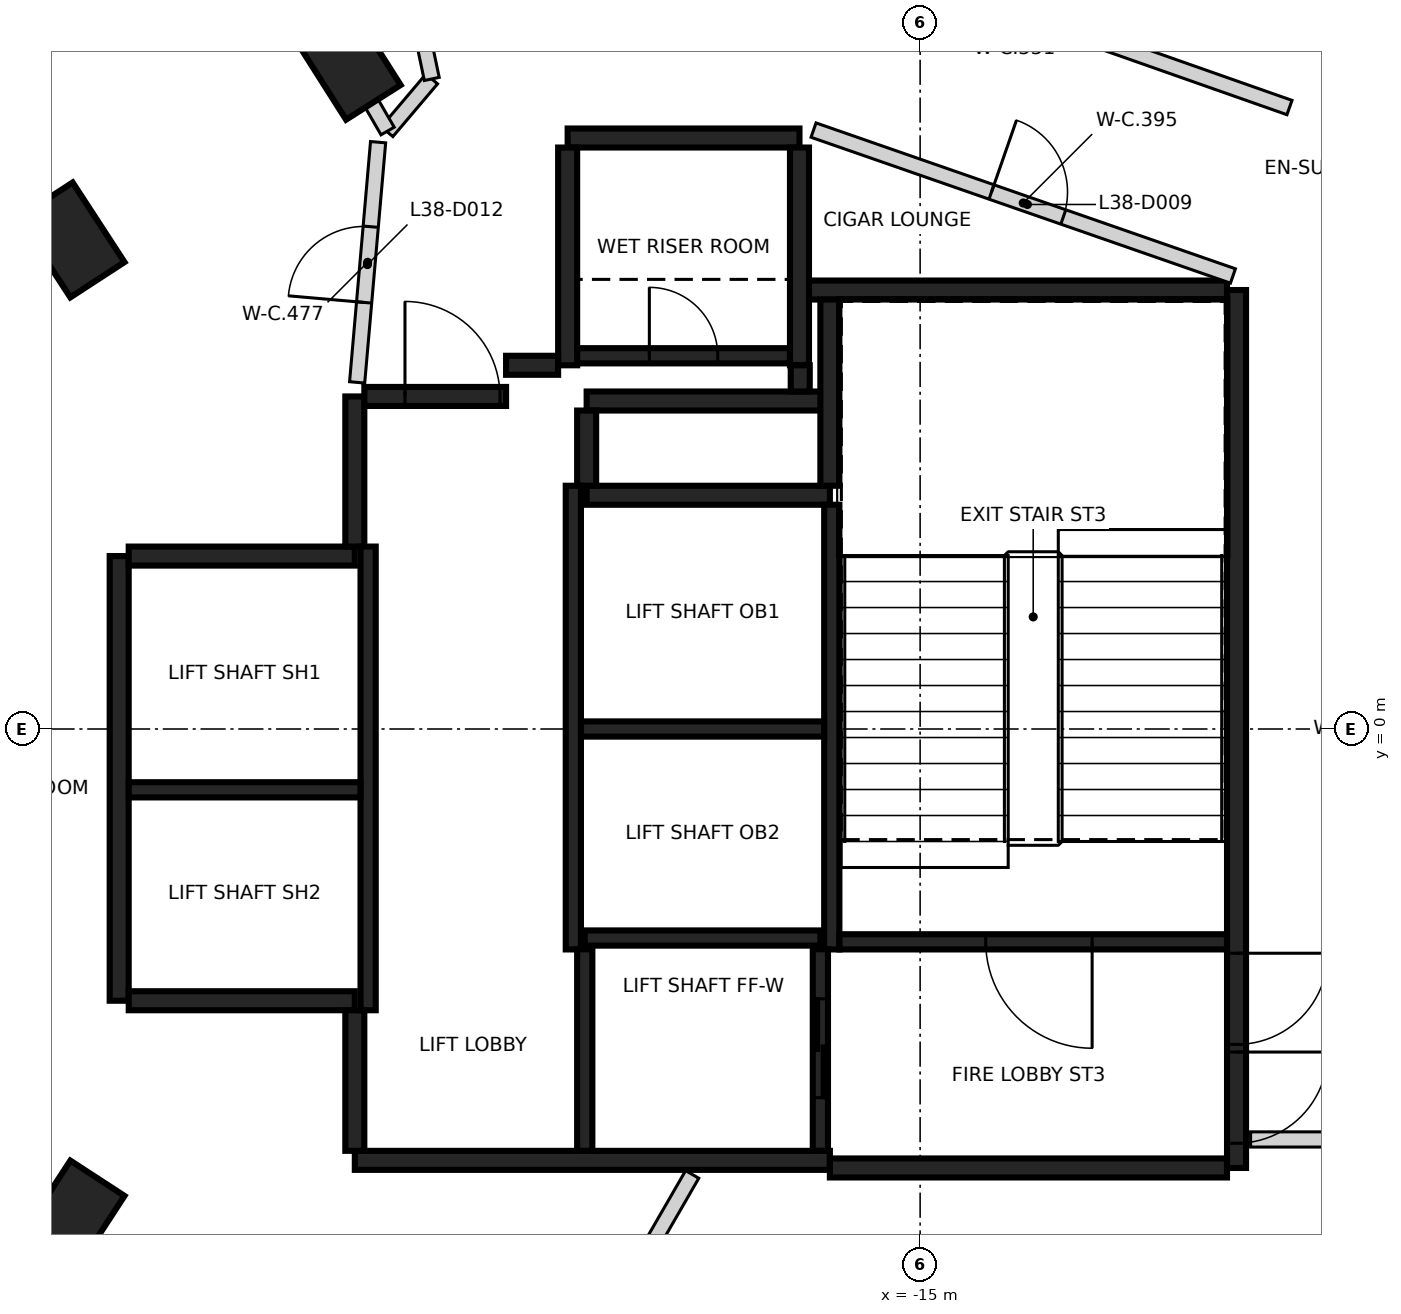
"""IFC4 building model, lengths in metres.
Left out: names, types, materials, properties, quantities, classifications, styles, units other than length and angle.
Written with IfcOpenShell. Run it as: python <this file> out.ifc"""

import sys

from ifc_helpers import new_model, si_unit, direction, frame, frame_2d, origin, origin_2d, place, context, subcontext, project, spatial, rectangle, extrude, element, fill, save


model = new_model("IFC4")
c1 = context("Model", 3, precision=1e-05, world=origin(), true_north=direction((0.0, 1.0)))
c2 = subcontext(c1, "Body", "Model", "MODEL_VIEW")
j1 = project(units=[si_unit("LENGTHUNIT", "METRE"), si_unit("PLANEANGLEUNIT", "RADIAN")], contexts=[c1])
p1 = place(None, origin())
s1 = spatial("IfcSite", under=j1, at=p1, CompositionType="ELEMENT")
p2 = place(p1, origin())
s2 = spatial("IfcBuilding", under=s1, at=p2, CompositionType="ELEMENT")
p3 = place(p2, frame((0.0, 0.0, 154.0)))
s3 = spatial("IfcBuildingStorey", under=s2, at=p3, CompositionType="ELEMENT", Elevation=154.0)
for number, where, z_axis, x_axis in (
    (1, (-22.529, 8.772, -0.4), (0.0, 0.0, 1.0), (-0.536, 0.844, 0.0)),
    (2, (-26.165, 6.434, -0.4), (0.0, 0.0, 1.0), (-0.546, 0.838, 0.0)),
    (3, (-26.165, -6.434, -0.4), (0.0, 0.0, 1.0), (0.546, 0.838, 0.0)),
):
    element("IfcColumn", number, at=place(p3, frame(where, z_axis=z_axis, x_axis=x_axis)), inside=s3, PredefinedType="COLUMN", context=c2, shape_type="SweptSolid", body=[
        extrude(rectangle(XDim=1.25, YDim=0.85, at=origin_2d()), origin(), (0.0, 0.0, 1.0), 3.6),
    ])
p4 = place(p3, frame((-10.837, 5.775, 0.0), z_axis=(0.0, 0.0, 1.0), x_axis=(0.0, -1.0, 0.0)))
e4 = element("IfcWall", 4, at=p4, inside=s3, PredefinedType="SHEAR", context=c2, shape_type="SweptSolid", body=[
    extrude(rectangle(XDim=11.55, YDim=0.25, at=frame_2d((5.775, 0.0))), origin(), (0.0, 0.0, 1.0), 3.2),
])
p5 = place(p4, frame((10.025, 0.0, 0.0)))
e5 = element("IfcOpeningElement", 5, at=p5, cuts=e4, PredefinedType="OPENING", context=c2, shape_type="SweptSolid", body=[
    extrude(rectangle(XDim=1.2, YDim=2.1, at=frame_2d((0.6, 1.05))), frame((0.0, 0.135, 0.0), z_axis=(0.0, -1.0, 0.0), x_axis=(1.0, 0.0, 0.0)), (0.0, 0.0, 1.0), 0.27),
])
p6 = place(p4, frame((8.725, 0.0, 0.0)))
e6 = element("IfcOpeningElement", 6, at=p6, cuts=e4, PredefinedType="OPENING", context=c2, shape_type="SweptSolid", body=[
    extrude(rectangle(XDim=1.2, YDim=2.1, at=frame_2d((0.6, 1.05))), frame((0.0, 0.135, 0.0), z_axis=(0.0, -1.0, 0.0), x_axis=(1.0, 0.0, 0.0)), (0.0, 0.0, 1.0), 0.27),
])
p7 = place(p3, frame((-16.187, -5.675, 0.0), z_axis=(0.0, 0.0, 1.0), x_axis=(-1.0, 0.0, 0.0)))
e7 = element("IfcWall", 7, at=p7, inside=s3, PredefinedType="SHEAR", context=c2, shape_type="SweptSolid", body=[
    extrude(rectangle(XDim=6.25, YDim=0.25, at=frame_2d((3.125, 0.0))), origin(), (0.0, 0.0, 1.0), 3.2),
])
p8 = place(p3, frame((-25.537, -3.575, 0.0), z_axis=(0.0, 0.0, 1.0), x_axis=(0.0, 1.0, 0.0)))
e8 = element("IfcWall", 8, at=p8, inside=s3, PredefinedType="SHEAR", context=c2, shape_type="SweptSolid", body=[
    extrude(rectangle(XDim=5.85, YDim=0.25, at=frame_2d((2.925, 0.0))), origin(), (0.0, 0.0, 1.0), 3.2),
])
p9 = place(p3, frame((-10.963, -5.775, 0.0), z_axis=(0.0, 0.0, 1.0), x_axis=(-1.0, 0.0, 0.0)))
e9 = element("IfcWall", 9, at=p9, inside=s3, PredefinedType="SHEAR", context=c2, shape_type="SweptSolid", body=[
    extrude(rectangle(XDim=5.225, YDim=0.25, at=frame_2d((2.612, 0.0))), origin(), (0.0, 0.0, 1.0), 3.2),
])
p10 = place(p3, frame((-16.472, 5.775, 0.0), z_axis=(0.0, 0.0, 1.0), x_axis=(1.0, 0.0, 0.0)))
e10 = element("IfcWall", 10, at=p10, inside=s3, PredefinedType="SHEAR", context=c2, shape_type="SweptSolid", body=[
    extrude(rectangle(XDim=5.51, YDim=0.25, at=frame_2d((2.755, 0.0))), origin(), (0.0, 0.0, 1.0), 3.2),
])
p11 = place(p3, frame((-19.387, 3.075, 0.0), z_axis=(0.0, 0.0, 1.0), x_axis=(1.0, 0.0, 0.0)))
e11 = element("IfcWall", 11, at=p11, inside=s3, PredefinedType="SHEAR", context=c2, shape_type="SweptSolid", body=[
    extrude(rectangle(XDim=3.2, YDim=0.25, at=frame_2d((1.6, 0.0))), origin(), (0.0, 0.0, 1.0), 3.2),
])
for number, where, z_axis, x_axis in (
    (12, (-22.437, -3.575, 0.0), (0.0, 0.0, 1.0), (-1.0, 0.0, 0.0)),
    (13, (-25.412, 2.275, 0.0), (0.0, 0.0, 1.0), (1.0, 0.0, 0.0)),
):
    element("IfcWall", number, at=place(p3, frame(where, z_axis=z_axis, x_axis=x_axis)), inside=s3, PredefinedType="SHEAR", context=c2, shape_type="SweptSolid", body=[
        extrude(rectangle(XDim=2.975, YDim=0.25, at=frame_2d((1.487, 0.0))), origin(), (0.0, 0.0, 1.0), 3.2),
    ])
p12 = place(p3, frame((-19.637, 7.775, 0.0), z_axis=(0.0, 0.0, 1.0), x_axis=(1.0, 0.0, 0.0)))
e14 = element("IfcWall", 14, at=p12, inside=s3, PredefinedType="SHEAR", context=c2, shape_type="SweptSolid", body=[
    extrude(rectangle(XDim=3.05, YDim=0.25, at=frame_2d((1.525, 0.0))), origin(), (0.0, 0.0, 1.0), 3.2),
])
for number, where, z_axis, x_axis in (
    (15, (-16.587, 7.65, 0.0), (0.0, 0.0, 1.0), (0.0, -1.0, 0.0)),
    (16, (-19.637, 4.785, 0.0), (0.0, 0.0, 1.0), (0.0, 1.0, 0.0)),
):
    element("IfcWall", number, at=place(p3, frame(where, z_axis=z_axis, x_axis=x_axis)), inside=s3, PredefinedType="SHEAR", context=c2, shape_type="SweptSolid", body=[
        extrude(rectangle(XDim=2.865, YDim=0.25, at=frame_2d((1.432, 0.0))), origin(), (0.0, 0.0, 1.0), 3.2),
    ])
p13 = place(p3, frame((-16.302, 4.315, 0.0), z_axis=(0.0, 0.0, 1.0), x_axis=(-1.0, 0.0, 0.0)))
e17 = element("IfcWall", 17, at=p13, inside=s3, PredefinedType="SHEAR", context=c2, shape_type="SweptSolid", body=[
    extrude(rectangle(XDim=3.085, YDim=0.25, at=frame_2d((1.542, 0.0))), origin(), (0.0, 0.0, 1.0), 3.2),
])
p14 = place(p3, frame((-16.187, 3.2, 0.0), z_axis=(0.0, 0.0, 1.0), x_axis=(0.0, 1.0, 0.0)))
e18 = element("IfcWall", 18, at=p14, inside=s3, PredefinedType="SHEAR", context=c2, shape_type="SweptSolid", body=[
    extrude(rectangle(XDim=2.449, YDim=0.25, at=frame_2d((1.225, 0.0))), origin(), (0.0, 0.0, 1.0), 3.2),
])
p15 = place(p3, frame((-22.437, 2.4, 0.0), z_axis=(0.0, 0.0, 1.0), x_axis=(0.0, 1.0, 0.0)))
e19 = element("IfcWall", 19, at=p15, inside=s3, PredefinedType="SHEAR", context=c2, shape_type="SweptSolid", body=[
    extrude(rectangle(XDim=1.975, YDim=0.25, at=frame_2d((0.987, 0.0))), origin(), (0.0, 0.0, 1.0), 3.2),
])
p16 = place(p3, frame((-22.437, -5.55, 0.0), z_axis=(0.0, 0.0, 1.0), x_axis=(0.0, 1.0, 0.0)))
e20 = element("IfcWall", 20, at=p16, inside=s3, PredefinedType="SHEAR", context=c2, shape_type="SweptSolid", body=[
    extrude(rectangle(XDim=1.849, YDim=0.25, at=frame_2d((0.925, 0.0))), origin(), (0.0, 0.0, 1.0), 3.2),
])
p17 = place(p3, frame((-22.312, 4.375, 0.0), z_axis=(0.0, 0.0, 1.0), x_axis=(1.0, 0.0, 0.0)))
e21 = element("IfcWall", 21, at=p17, inside=s3, PredefinedType="SHEAR", context=c2, shape_type="SweptSolid", body=[
    extrude(rectangle(XDim=1.865, YDim=0.25, at=frame_2d((0.932, 0.0))), origin(), (0.0, 0.0, 1.0), 3.2),
])
p18 = place(p17, frame((0.535, 0.0, 0.0)))
e22 = element("IfcOpeningElement", 22, at=p18, cuts=e21, PredefinedType="OPENING", context=c2, shape_type="SweptSolid", body=[
    extrude(rectangle(XDim=1.25, YDim=2.1, at=frame_2d((0.625, 1.05))), frame((0.0, 0.135, 0.0), z_axis=(0.0, -1.0, 0.0), x_axis=(1.0, 0.0, 0.0)), (0.0, 0.0, 1.0), 0.27),
])
p19 = place(p3, frame((-19.387, 4.19, 0.0), z_axis=(0.0, 0.0, 1.0), x_axis=(0.0, -1.0, 0.0)))
e23 = element("IfcWall", 23, at=p19, inside=s3, PredefinedType="SHEAR", context=c2, shape_type="SweptSolid", body=[
    extrude(rectangle(XDim=0.989, YDim=0.25, at=frame_2d((0.495, 0.0))), origin(), (0.0, 0.0, 1.0), 3.2),
])
p20 = place(p3, frame((-20.447, 4.785, 0.0), z_axis=(0.0, 0.0, 1.0), x_axis=(1.0, 0.0, 0.0)))
e24 = element("IfcWall", 24, at=p20, inside=s3, PredefinedType="SHEAR", context=c2, shape_type="SweptSolid", body=[
    extrude(rectangle(XDim=0.685, YDim=0.25, at=frame_2d((0.342, 0.0))), origin(), (0.0, 0.0, 1.0), 3.2),
])
p21 = place(p3, frame((-16.577, 4.785, 0.0), z_axis=(0.0, 0.0, 1.0), x_axis=(0.0, -1.0, 0.0)))
e25 = element("IfcWall", 25, at=p21, inside=s3, PredefinedType="SHEAR", context=c2, shape_type="SweptSolid", body=[
    extrude(rectangle(XDim=0.344, YDim=0.25, at=frame_2d((0.172, 0.0))), origin(), (0.0, 0.0, 1.0), 3.2),
])
p22 = place(p3, frame((-16.162, 2.951, 0.0), z_axis=(0.0, 0.0, 1.0), x_axis=(0.0, -1.0, 0.0)))
e26 = element("IfcWall", 26, at=p22, inside=s3, PredefinedType="SHEAR", context=c2, shape_type="SweptSolid", body=[
    extrude(rectangle(XDim=5.851, YDim=0.2, at=frame_2d((2.925, 0.0))), origin(), (0.0, 0.0, 1.0), 3.2),
])
for number, where, z_axis, x_axis in (
    (27, (-19.562, -2.9, 0.0), (0.0, 0.0, 1.0), (0.0, 1.0, 0.0)),
    (28, (-22.262, 2.4, 0.0), (0.0, 0.0, 1.0), (0.0, -1.0, 0.0)),
):
    element("IfcWall", number, at=place(p3, frame(where, z_axis=z_axis, x_axis=x_axis)), inside=s3, PredefinedType="SHEAR", context=c2, shape_type="SweptSolid", body=[
        extrude(rectangle(XDim=6.1, YDim=0.2, at=frame_2d((3.05, 0.0))), origin(), (0.0, 0.0, 1.0), 3.2),
    ])
p23 = place(p3, frame((-10.963, -2.8, 0.0), z_axis=(0.0, 0.0, 1.0), x_axis=(-1.0, 0.0, 0.0)))
e29 = element("IfcWall", 29, at=p23, inside=s3, PredefinedType="SHEAR", context=c2, shape_type="SweptSolid", body=[
    extrude(rectangle(XDim=5.098, YDim=0.2, at=frame_2d((2.549, 0.0))), origin(), (0.0, 0.0, 1.0), 3.2),
])
p24 = place(p23, frame((1.774, 0.0, 0.0)))
e30 = element("IfcOpeningElement", 30, at=p24, cuts=e29, PredefinedType="OPENING", context=c2, shape_type="SweptSolid", body=[
    extrude(rectangle(XDim=1.4, YDim=2.1, at=frame_2d((0.7, 1.05))), frame((0.0, 0.11, 0.0), z_axis=(0.0, -1.0, 0.0), x_axis=(1.0, 0.0, 0.0)), (0.0, 0.0, 1.0), 0.22),
])
p25 = place(p3, frame((-16.263, 0.0, 0.0), z_axis=(0.0, 0.0, 1.0), x_axis=(-1.0, 0.0, 0.0)))
e31 = element("IfcWall", 31, at=p25, inside=s3, PredefinedType="SHEAR", context=c2, shape_type="SweptSolid", body=[
    extrude(rectangle(XDim=3.198, YDim=0.2, at=frame_2d((1.599, 0.0))), origin(), (0.0, 0.0, 1.0), 3.2),
])
p26 = place(p3, frame((-22.363, -0.8, 0.0), z_axis=(0.0, 0.0, 1.0), x_axis=(-1.0, 0.0, 0.0)))
e32 = element("IfcWall", 32, at=p26, inside=s3, PredefinedType="SHEAR", context=c2, shape_type="SweptSolid", body=[
    extrude(rectangle(XDim=3.048, YDim=0.2, at=frame_2d((1.524, 0.0))), origin(), (0.0, 0.0, 1.0), 3.2),
])
p27 = place(p3, frame((-19.511, 4.91, 0.0), z_axis=(0.0, 0.0, 1.0), x_axis=(1.0, 0.0, 0.0)))
e33 = element("IfcWall", 33, at=p27, inside=s3, PredefinedType="SHEAR", context=c2, shape_type="SweptSolid", body=[
    extrude(rectangle(XDim=2.798, YDim=0.2, at=frame_2d((1.399, 0.0))), origin(), (0.0, 0.0, 1.0), 3.2),
])
p28 = place(p27, frame((0.949, 0.0, 0.0)))
e34 = element("IfcOpeningElement", 34, at=p28, cuts=e33, PredefinedType="OPENING", context=c2, shape_type="SweptSolid", body=[
    extrude(rectangle(XDim=0.9, YDim=2.1, at=frame_2d((0.45, 1.05))), frame((0.0, 0.11, 0.0), z_axis=(0.0, -1.0, 0.0), x_axis=(1.0, 0.0, 0.0)), (0.0, 0.0, 1.0), 0.22),
])
p29 = place(p3, frame((-19.412, -2.75, 0.0), z_axis=(0.0, 0.0, 1.0), x_axis=(1.0, 0.0, 0.0)))
e35 = element("IfcWall", 35, at=p29, inside=s3, PredefinedType="SHEAR", context=c2, shape_type="SweptSolid", body=[
    extrude(rectangle(XDim=3.1, YDim=0.2, at=frame_2d((1.55, 0.0))), origin(), (0.0, 0.0, 1.0), 3.2),
])
p30 = place(p3, frame((-16.312, -2.898, 0.0), z_axis=(0.0, 0.0, 1.0), x_axis=(0.0, -1.0, 0.0)))
e36 = element("IfcWall", 36, at=p30, inside=s3, PredefinedType="SHEAR", context=c2, shape_type="SweptSolid", body=[
    extrude(rectangle(XDim=2.651, YDim=0.2, at=frame_2d((1.325, 0.0))), origin(), (0.0, 0.0, 1.0), 3.2),
])
p31 = place(p30, frame((0.652, 0.0, 0.0)))
e37 = element("IfcOpeningElement", 37, at=p31, cuts=e36, PredefinedType="OPENING", context=c2, shape_type="SweptSolid", body=[
    extrude(rectangle(XDim=1.3, YDim=2.1, at=frame_2d((0.65, 1.05))), frame((0.0, 0.11, 0.0), z_axis=(0.0, -1.0, 0.0), x_axis=(1.0, 0.0, 0.0)), (0.0, 0.0, 1.0), 0.22),
])
p32 = place(p3, frame((-19.412, -5.549, 0.0), z_axis=(0.0, 0.0, 1.0), x_axis=(0.0, 1.0, 0.0)))
e38 = element("IfcWall", 38, at=p32, inside=s3, PredefinedType="SHEAR", context=c2, shape_type="SweptSolid", body=[
    extrude(rectangle(XDim=2.651, YDim=0.2, at=frame_2d((1.325, 0.0))), origin(), (0.0, 0.0, 1.0), 3.2),
])
p33 = place(p3, frame((-22.407, 4.56, 0.0), z_axis=(0.0, 0.0, 1.0), x_axis=(0.086898645684, 0.996217157741, 0.0)))
e39 = element("IfcWall", 39, at=p33, inside=s3, PredefinedType="PARTITIONING", context=c2, shape_type="SweptSolid", body=[
    extrude(rectangle(XDim=3.172, YDim=0.2, at=frame_2d((1.586, 0.0))), origin(), (0.0, 0.0, 1.0), 3.2),
])
p34 = place(p33, frame((1.056, 0.0, 0.0)))
e40 = element("IfcOpeningElement", 40, at=p34, cuts=e39, PredefinedType="OPENING", context=c2, shape_type="SweptSolid", body=[
    extrude(rectangle(XDim=1.0, YDim=2.1, at=frame_2d((0.5, 1.05))), frame((0.0, 0.11, 0.0), z_axis=(0.0, -1.0, 0.0), x_axis=(1.0, 0.0, 0.0)), (0.0, 0.0, 1.0), 0.22),
])
p35 = place(p3, frame((-22.013, 7.858, 0.0), z_axis=(0.0, 0.0, 1.0), x_axis=(0.646315152402, 0.763070588986, 0.0)))
e41 = element("IfcWall", 41, at=p35, inside=s3, PredefinedType="PARTITIONING", context=c2, shape_type="SweptSolid", body=[
    extrude(rectangle(XDim=0.91, YDim=0.2, at=frame_2d((0.455, 0.0))), origin(), (0.0, 0.0, 1.0), 3.2),
])
p36 = place(p3, frame((-21.605, 9.412, 0.0), z_axis=(0.0, 0.0, 1.0), x_axis=(0.204764111512, -0.978811349871, 0.0)))
e42 = element("IfcWall", 42, at=p36, inside=s3, PredefinedType="PARTITIONING", context=c2, shape_type="SweptSolid", body=[
    extrude(rectangle(XDim=0.879, YDim=0.2, at=frame_2d((0.439, 0.0))), origin(), (0.0, 0.0, 1.0), 2.3),
])
p37 = place(p3, frame((-16.402, 7.879, 0.0), z_axis=(0.0, 0.0, 1.0), x_axis=(0.94449961557, -0.328512520596, 0.0)))
e43 = element("IfcWall", 43, at=p37, inside=s3, PredefinedType="PARTITIONING", context=c2, shape_type="SweptSolid", body=[
    extrude(rectangle(XDim=5.842, YDim=0.2, at=frame_2d((2.921, 0.0))), origin(), (0.0, 0.0, 1.0), 3.2),
])
p38 = place(p37, frame((2.479, 0.0, 0.0)))
e44 = element("IfcOpeningElement", 44, at=p38, cuts=e43, PredefinedType="OPENING", context=c2, shape_type="SweptSolid", body=[
    extrude(rectangle(XDim=1.0, YDim=2.1, at=frame_2d((0.5, 1.05))), frame((0.0, 0.11, 0.0), z_axis=(0.0, -1.0, 0.0), x_axis=(1.0, 0.0, 0.0)), (0.0, 0.0, 1.0), 0.22),
])
p39 = place(p3, frame((-16.026, 10.246, 0.0), z_axis=(0.0, 0.0, 1.0), x_axis=(0.943337348352, -0.331835271187, 0.0)))
e45 = element("IfcWall", 45, at=p39, inside=s3, PredefinedType="PARTITIONING", context=c2, shape_type="SweptSolid", body=[
    extrude(rectangle(XDim=6.238, YDim=0.2, at=frame_2d((3.119, 0.0))), origin(), (0.0, 0.0, 1.0), 3.2),
])
p40 = place(p39, frame((0.2, 0.0, 0.0)))
e46 = element("IfcOpeningElement", 46, at=p40, cuts=e45, PredefinedType="OPENING", context=c2, shape_type="SweptSolid", body=[
    extrude(rectangle(XDim=0.95, YDim=2.1, at=frame_2d((0.475, 1.05))), frame((0.0, 0.11, 0.0), z_axis=(0.0, -1.0, 0.0), x_axis=(1.0, 0.0, 0.0)), (0.0, 0.0, 1.0), 0.22),
])
p41 = place(p3, frame((-10.652, -5.4, 0.0), z_axis=(0.0, 0.0, 1.0), x_axis=(1.0, 0.0, 0.0)))
e47 = element("IfcWall", 47, at=p41, inside=s3, PredefinedType="PARTITIONING", context=c2, shape_type="SweptSolid", body=[
    extrude(rectangle(XDim=1.39, YDim=0.2, at=frame_2d((0.695, 0.0))), origin(), (0.0, 0.0, 1.0), 3.2),
])
p42 = place(p3, frame((-23.758, 10.9, 0.0), z_axis=(0.0, 0.0, 1.0), x_axis=(0.500112665219, -0.865960346718, 0.0)))
e48 = element("IfcWall", 48, at=p42, inside=s3, PredefinedType="PARTITIONING", context=c2, shape_type="SweptSolid", body=[
    extrude(rectangle(XDim=3.502, YDim=0.2, at=frame_2d((1.751, 0.0))), origin(), (0.0, 0.0, 1.0), 3.2),
])
p43 = place(p3, frame((-21.664, -12.21, 0.0), z_axis=(0.0, 0.0, 1.0), x_axis=(0.499938621367, 0.866060837855, 0.0)))
e49 = element("IfcWall", 49, at=p43, inside=s3, PredefinedType="PARTITIONING", context=c2, shape_type="SweptSolid", body=[
    extrude(rectangle(XDim=7.333, YDim=0.2, at=frame_2d((3.666, 0.0))), origin(), (0.0, 0.0, 1.0), 2.3),
])
p44 = place(p3, frame((-10.071, 19.158, 0.0), z_axis=(0.0, 0.0, 1.0), x_axis=(0.499905140254, -0.866080164158, 0.0)))
e50 = element("IfcWall", 50, at=p44, inside=s3, PredefinedType="PARTITIONING", context=c2, shape_type="SweptSolid", body=[
    extrude(rectangle(XDim=13.227, YDim=0.2, at=frame_2d((6.613, 0.0))), origin(), (0.0, 0.0, 1.0), 2.3),
])
p45 = place(p31, origin())
e51 = element("IfcDoor", 51, at=p45, inside=s3, OperationType="SLIDING_TO_RIGHT", PredefinedType="DOOR", context=c2, shape_type="SweptSolid", body=[
    extrude(rectangle(XDim=1.3, YDim=2.1, at=frame_2d((0.65, 1.05))), frame((0.0, 0.025, 0.0), z_axis=(0.0, -1.0, 0.0), x_axis=(1.0, 0.0, 0.0)), (0.0, 0.0, 1.0), 0.05),
])
fill(e37, e51)
p46 = place(p18, origin())
e52 = element("IfcDoor", 52, at=p46, inside=s3, OperationType="SINGLE_SWING_LEFT", PredefinedType="DOOR", context=c2, shape_type="SweptSolid", body=[
    extrude(rectangle(XDim=1.25, YDim=2.1, at=frame_2d((0.625, 1.05))), frame((0.0, 0.025, 0.0), z_axis=(0.0, -1.0, 0.0), x_axis=(1.0, 0.0, 0.0)), (0.0, 0.0, 1.0), 0.05),
])
fill(e22, e52)
p47 = place(p5, origin())
e53 = element("IfcDoor", 53, at=p47, inside=s3, OperationType="SINGLE_SWING_LEFT", PredefinedType="DOOR", context=c2, shape_type="SweptSolid", body=[
    extrude(rectangle(XDim=1.2, YDim=2.1, at=frame_2d((0.6, 1.05))), frame((0.0, 0.025, 0.0), z_axis=(0.0, -1.0, 0.0), x_axis=(1.0, 0.0, 0.0)), (0.0, 0.0, 1.0), 0.05),
])
fill(e5, e53)
p48 = place(p6, origin())
e54 = element("IfcDoor", 54, at=p48, inside=s3, OperationType="SINGLE_SWING_RIGHT", PredefinedType="DOOR", context=c2, shape_type="SweptSolid", body=[
    extrude(rectangle(XDim=1.2, YDim=2.1, at=frame_2d((0.6, 1.05))), frame((0.0, 0.025, 0.0), z_axis=(0.0, -1.0, 0.0), x_axis=(1.0, 0.0, 0.0)), (0.0, 0.0, 1.0), 0.05),
])
fill(e6, e54)
p49 = place(p24, origin())
e55 = element("IfcDoor", 55, at=p49, inside=s3, OperationType="SINGLE_SWING_RIGHT", PredefinedType="DOOR", context=c2, shape_type="SweptSolid", body=[
    extrude(rectangle(XDim=1.4, YDim=2.1, at=frame_2d((0.7, 1.05))), frame((0.0, 0.025, 0.0), z_axis=(0.0, -1.0, 0.0), x_axis=(1.0, 0.0, 0.0)), (0.0, 0.0, 1.0), 0.05),
])
fill(e30, e55)
p50 = place(p28, origin())
e56 = element("IfcDoor", 56, at=p50, inside=s3, OperationType="SINGLE_SWING_LEFT", PredefinedType="DOOR", context=c2, shape_type="SweptSolid", body=[
    extrude(rectangle(XDim=0.9, YDim=2.1, at=frame_2d((0.45, 1.05))), frame((0.0, 0.025, 0.0), z_axis=(0.0, -1.0, 0.0), x_axis=(1.0, 0.0, 0.0)), (0.0, 0.0, 1.0), 0.05),
])
fill(e34, e56)
p51 = place(p38, frame((1.0, 0.0, 0.0), z_axis=(0.0, 0.0, 1.0), x_axis=(-1.0, 0.0, 0.0)))
e57 = element("IfcDoor", 57, at=p51, inside=s3, OperationType="SINGLE_SWING_LEFT", PredefinedType="DOOR", context=c2, shape_type="SweptSolid", body=[
    extrude(rectangle(XDim=1.0, YDim=2.1, at=frame_2d((0.5, 1.05))), frame((0.0, 0.025, 0.0), z_axis=(0.0, -1.0, 0.0), x_axis=(1.0, 0.0, 0.0)), (0.0, 0.0, 1.0), 0.05),
])
fill(e44, e57)
p52 = place(p34, origin())
e58 = element("IfcDoor", 58, at=p52, inside=s3, OperationType="SINGLE_SWING_LEFT", PredefinedType="DOOR", context=c2, shape_type="SweptSolid", body=[
    extrude(rectangle(XDim=1.0, YDim=2.1, at=frame_2d((0.5, 1.05))), frame((0.0, 0.025, 0.0), z_axis=(0.0, -1.0, 0.0), x_axis=(1.0, 0.0, 0.0)), (0.0, 0.0, 1.0), 0.05),
])
fill(e40, e58)
save(model, sys.argv[1])
